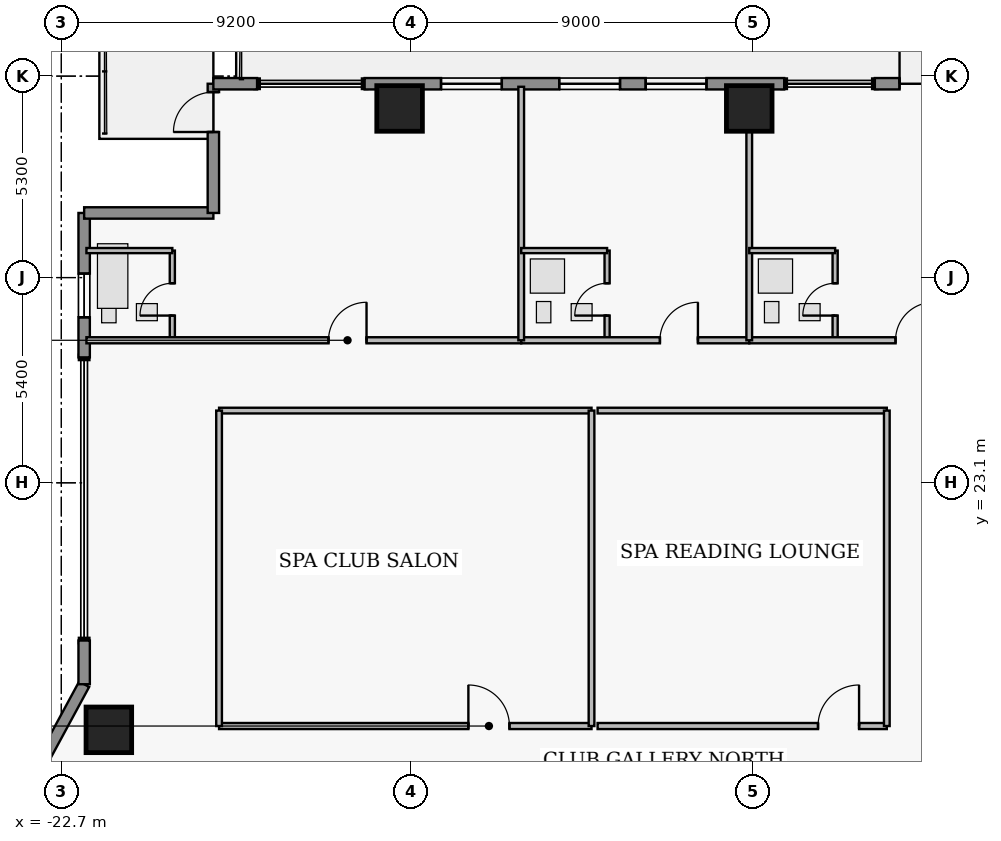
"""IFC4 building model, lengths in metres.
Left out: names, types, materials, properties, quantities, classifications, styles, units other than length and angle.
Written with IfcOpenShell. Run it as: python <this file> out.ifc"""

import sys

from ifc_helpers import new_model, si_unit, direction, frame, frame_2d, origin, origin_2d, place, context, subcontext, project, spatial, rectangle, extrude, element, fill, save


model = new_model("IFC4")
c1 = context("Model", 3, precision=1e-05, world=origin(), true_north=direction((0.0, 1.0)))
c2 = subcontext(c1, "Body", "Model", "MODEL_VIEW")
j1 = project(units=[si_unit("LENGTHUNIT", "METRE"), si_unit("PLANEANGLEUNIT", "RADIAN")], contexts=[c1])
p1 = place(None, origin())
s1 = spatial("IfcSite", under=j1, at=p1, CompositionType="ELEMENT")
p2 = place(p1, origin())
s2 = spatial("IfcBuilding", under=s1, at=p2, CompositionType="ELEMENT")
p3 = place(p2, frame((0.0, 0.0, 181.15)))
s3 = spatial("IfcBuildingStorey", under=s2, at=p3, CompositionType="ELEMENT", Elevation=181.15)
for number, where, z_axis, x_axis in (
    (1, (-13.8, 32.95, 0.0), (0.0, 0.0, 1.0), (1.0, 0.0, 0.0)),
    (2, (-4.6, 32.95, 0.0), (0.0, 0.0, 1.0), (1.0, 0.0, 0.0)),
    (3, (-21.45, 16.6, 0.0), (0.0, 0.0, 1.0), (1.0, 0.0, 0.0)),
):
    element("IfcColumn", number, at=place(p3, frame(where, z_axis=z_axis, x_axis=x_axis)), inside=s3, PredefinedType="COLUMN", context=c2, shape_type="SweptSolid", body=[
        extrude(rectangle(XDim=1.2, YDim=1.2, at=origin_2d()), origin(), (0.0, 0.0, 1.0), 3.75),
    ])
p4 = place(p3, frame((-24.7, 13.0, 0.0), z_axis=(0.0, 0.0, 1.0), x_axis=(0.476258655584, 0.879305233114, 0.0)))
e4 = element("IfcWall", 4, at=p4, inside=s3, PredefinedType="STANDARD", context=c2, shape_type="SweptSolid", body=[
    extrude(rectangle(XDim=5.459, YDim=0.3, at=frame_2d((2.729, 0.0))), origin(), (0.0, 0.0, 1.0), 3.53),
])
p5 = place(p3, frame((-22.1, 17.8, 0.0), z_axis=(0.0, 0.0, 1.0), x_axis=(0.0, 1.0, 0.0)))
e5 = element("IfcWall", 5, at=p5, inside=s3, PredefinedType="STANDARD", context=c2, shape_type="SweptSolid", body=[
    extrude(rectangle(XDim=1.15, YDim=0.3, at=frame_2d((0.575, 0.0))), origin(), (0.0, 0.0, 1.0), 3.53),
])
p6 = place(p3, frame((-22.1, 26.4, 0.0), z_axis=(0.0, 0.0, 1.0), x_axis=(0.0, 1.0, 0.0)))
e6 = element("IfcWall", 6, at=p6, inside=s3, PredefinedType="STANDARD", context=c2, shape_type="SweptSolid", body=[
    extrude(rectangle(XDim=3.8, YDim=0.3, at=frame_2d((1.9, 0.0))), origin(), (0.0, 0.0, 1.0), 3.53),
])
p7 = place(p6, frame((1.055, 0.0, 0.95)))
e7 = element("IfcOpeningElement", 7, at=p7, cuts=e6, PredefinedType="OPENING", context=c2, shape_type="SweptSolid", body=[
    extrude(rectangle(XDim=1.15, YDim=1.55, at=frame_2d((0.575, 0.775))), frame((0.0, 0.16, 0.0), z_axis=(0.0, -1.0, 0.0), x_axis=(1.0, 0.0, 0.0)), (0.0, 0.0, 1.0), 0.32),
])
p8 = place(p3, frame((-22.1, 30.2, 0.0), z_axis=(0.0, 0.0, 1.0), x_axis=(1.0, 0.0, 0.0)))
e8 = element("IfcWall", 8, at=p8, inside=s3, PredefinedType="STANDARD", context=c2, shape_type="SweptSolid", body=[
    extrude(rectangle(XDim=3.4, YDim=0.3, at=frame_2d((1.7, 0.0))), origin(), (0.0, 0.0, 1.0), 3.53),
])
p9 = place(p3, frame((-18.7, 30.2, 0.0), z_axis=(0.0, 0.0, 1.0), x_axis=(0.0, 1.0, 0.0)))
e9 = element("IfcWall", 9, at=p9, inside=s3, PredefinedType="STANDARD", context=c2, shape_type="SweptSolid", body=[
    extrude(rectangle(XDim=3.4, YDim=0.3, at=frame_2d((1.7, 0.0))), origin(), (0.0, 0.0, 1.0), 3.53),
])
p10 = place(p9, frame((2.13, 0.0, 0.0)))
e10 = element("IfcOpeningElement", 10, at=p10, cuts=e9, PredefinedType="OPENING", context=c2, shape_type="SweptSolid", body=[
    extrude(rectangle(XDim=1.05, YDim=2.2, at=frame_2d((0.525, 1.1))), frame((0.0, 0.16, 0.0), z_axis=(0.0, -1.0, 0.0), x_axis=(1.0, 0.0, 0.0)), (0.0, 0.0, 1.0), 0.32),
])
p11 = place(p3, frame((-18.7, 33.6, 0.0), z_axis=(0.0, 0.0, 1.0), x_axis=(1.0, 0.0, 0.0)))
e11 = element("IfcWall", 11, at=p11, inside=s3, PredefinedType="STANDARD", context=c2, shape_type="SweptSolid", body=[
    extrude(rectangle(XDim=1.15, YDim=0.3, at=frame_2d((0.575, 0.0))), origin(), (0.0, 0.0, 1.0), 3.53),
])
p12 = place(p3, frame((-14.72, 33.6, 0.0), z_axis=(0.0, 0.0, 1.0), x_axis=(1.0, 0.0, 0.0)))
e12 = element("IfcWall", 12, at=p12, inside=s3, PredefinedType="STANDARD", context=c2, shape_type="SweptSolid", body=[
    extrude(rectangle(XDim=11.04, YDim=0.3, at=frame_2d((5.52, 0.0))), origin(), (0.0, 0.0, 1.0), 3.53),
])
p13 = place(p12, frame((5.12, 0.0, 0.85)))
e13 = element("IfcOpeningElement", 13, at=p13, cuts=e12, PredefinedType="OPENING", context=c2, shape_type="SweptSolid", body=[
    extrude(rectangle(XDim=1.6, YDim=1.8, at=frame_2d((0.8, 0.9))), frame((0.0, 0.16, 0.0), z_axis=(0.0, -1.0, 0.0), x_axis=(1.0, 0.0, 0.0)), (0.0, 0.0, 1.0), 0.32),
])
p14 = place(p12, frame((2.01, 0.0, 0.85)))
e14 = element("IfcOpeningElement", 14, at=p14, cuts=e12, PredefinedType="OPENING", context=c2, shape_type="SweptSolid", body=[
    extrude(rectangle(XDim=1.6, YDim=1.8, at=frame_2d((0.8, 0.9))), frame((0.0, 0.16, 0.0), z_axis=(0.0, -1.0, 0.0), x_axis=(1.0, 0.0, 0.0)), (0.0, 0.0, 1.0), 0.32),
])
p15 = place(p12, frame((7.395, 0.0, 0.85)))
e15 = element("IfcOpeningElement", 15, at=p15, cuts=e12, PredefinedType="OPENING", context=c2, shape_type="SweptSolid", body=[
    extrude(rectangle(XDim=1.6, YDim=1.8, at=frame_2d((0.8, 0.9))), frame((0.0, 0.16, 0.0), z_axis=(0.0, -1.0, 0.0), x_axis=(1.0, 0.0, 0.0)), (0.0, 0.0, 1.0), 0.32),
])
p16 = place(p3, frame((-1.295, 33.6, 0.0), z_axis=(0.0, 0.0, 1.0), x_axis=(1.0, 0.0, 0.0)))
e16 = element("IfcWall", 16, at=p16, inside=s3, PredefinedType="STANDARD", context=c2, shape_type="SweptSolid", body=[
    extrude(rectangle(XDim=6.815, YDim=0.3, at=frame_2d((3.407, 0.0))), origin(), (0.0, 0.0, 1.0), 3.53),
])
p17 = place(p16, frame((0.65, 0.0, 0.0)))
e17 = element("IfcOpeningElement", 17, at=p17, cuts=e16, PredefinedType="OPENING", context=c2, shape_type="SweptSolid", body=[
    extrude(rectangle(XDim=1.05, YDim=2.2, at=frame_2d((0.525, 1.1))), frame((0.0, 0.16, 0.0), z_axis=(0.0, -1.0, 0.0), x_axis=(1.0, 0.0, 0.0)), (0.0, 0.0, 1.0), 0.32),
])
p18 = place(p16, frame((3.63, 0.0, 0.95)))
e18 = element("IfcOpeningElement", 18, at=p18, cuts=e16, PredefinedType="OPENING", context=c2, shape_type="SweptSolid", body=[
    extrude(rectangle(XDim=1.15, YDim=1.55, at=frame_2d((0.575, 0.775))), frame((0.0, 0.16, 0.0), z_axis=(0.0, -1.0, 0.0), x_axis=(1.0, 0.0, 0.0)), (0.0, 0.0, 1.0), 0.32),
])
p19 = place(p3, frame((-19.78, 26.85, 0.0), z_axis=(0.0, 0.0, 1.0), x_axis=(0.0, 1.0, 0.0)))
e19 = element("IfcWall", 19, at=p19, inside=s3, PredefinedType="PLUMBINGWALL", context=c2, shape_type="SweptSolid", body=[
    extrude(rectangle(XDim=2.36, YDim=0.135, at=frame_2d((1.18, 0.0))), origin(), (0.0, 0.0, 1.0), 3.53),
])
p20 = place(p19, frame((0.65, 0.0, 0.0)))
e20 = element("IfcOpeningElement", 20, at=p20, cuts=e19, PredefinedType="OPENING", context=c2, shape_type="SweptSolid", body=[
    extrude(rectangle(XDim=0.85, YDim=2.1, at=frame_2d((0.425, 1.05))), frame((0.0, 0.077, 0.0), z_axis=(0.0, -1.0, 0.0), x_axis=(1.0, 0.0, 0.0)), (0.0, 0.0, 1.0), 0.155),
])
p21 = place(p3, frame((-22.04, 26.85, 0.0), z_axis=(0.0, 0.0, 1.0), x_axis=(1.0, 0.0, 0.0)))
e21 = element("IfcWall", 21, at=p21, inside=s3, PredefinedType="PARTITIONING", context=c2, shape_type="SweptSolid", body=[
    extrude(rectangle(XDim=11.44, YDim=0.16, at=frame_2d((5.72, 0.0))), origin(), (0.0, 0.0, 1.0), 3.53),
])
p22 = place(p21, frame((6.37, 0.0, 0.0)))
e22 = element("IfcOpeningElement", 22, at=p22, cuts=e21, PredefinedType="OPENING", context=c2, shape_type="SweptSolid", body=[
    extrude(rectangle(XDim=1.0, YDim=2.15, at=frame_2d((0.5, 1.075))), frame((0.0, 0.09, 0.0), z_axis=(0.0, -1.0, 0.0), x_axis=(1.0, 0.0, 0.0)), (0.0, 0.0, 1.0), 0.18),
])
p23 = place(p3, frame((-8.34, 26.85, 0.0), z_axis=(0.0, 0.0, 1.0), x_axis=(0.0, 1.0, 0.0)))
e23 = element("IfcWall", 23, at=p23, inside=s3, PredefinedType="PLUMBINGWALL", context=c2, shape_type="SweptSolid", body=[
    extrude(rectangle(XDim=2.36, YDim=0.135, at=frame_2d((1.18, 0.0))), origin(), (0.0, 0.0, 1.0), 3.53),
])
p24 = place(p23, frame((0.65, 0.0, 0.0)))
e24 = element("IfcOpeningElement", 24, at=p24, cuts=e23, PredefinedType="OPENING", context=c2, shape_type="SweptSolid", body=[
    extrude(rectangle(XDim=0.85, YDim=2.1, at=frame_2d((0.425, 1.05))), frame((0.0, 0.077, 0.0), z_axis=(0.0, -1.0, 0.0), x_axis=(1.0, 0.0, 0.0)), (0.0, 0.0, 1.0), 0.155),
])
p25 = place(p3, frame((-10.6, 26.85, 0.0), z_axis=(0.0, 0.0, 1.0), x_axis=(1.0, 0.0, 0.0)))
e25 = element("IfcWall", 25, at=p25, inside=s3, PredefinedType="PARTITIONING", context=c2, shape_type="SweptSolid", body=[
    extrude(rectangle(XDim=6.0, YDim=0.16, at=frame_2d((3.0, 0.0))), origin(), (0.0, 0.0, 1.0), 3.53),
])
p26 = place(p25, frame((3.65, 0.0, 0.0)))
e26 = element("IfcOpeningElement", 26, at=p26, cuts=e25, PredefinedType="OPENING", context=c2, shape_type="SweptSolid", body=[
    extrude(rectangle(XDim=1.0, YDim=2.15, at=frame_2d((0.5, 1.075))), frame((0.0, 0.09, 0.0), z_axis=(0.0, -1.0, 0.0), x_axis=(1.0, 0.0, 0.0)), (0.0, 0.0, 1.0), 0.18),
])
p27 = place(p3, frame((-2.34, 26.85, 0.0), z_axis=(0.0, 0.0, 1.0), x_axis=(0.0, 1.0, 0.0)))
e27 = element("IfcWall", 27, at=p27, inside=s3, PredefinedType="PLUMBINGWALL", context=c2, shape_type="SweptSolid", body=[
    extrude(rectangle(XDim=2.36, YDim=0.135, at=frame_2d((1.18, 0.0))), origin(), (0.0, 0.0, 1.0), 3.53),
])
p28 = place(p27, frame((0.65, 0.0, 0.0)))
e28 = element("IfcOpeningElement", 28, at=p28, cuts=e27, PredefinedType="OPENING", context=c2, shape_type="SweptSolid", body=[
    extrude(rectangle(XDim=0.85, YDim=2.1, at=frame_2d((0.425, 1.05))), frame((0.0, 0.077, 0.0), z_axis=(0.0, -1.0, 0.0), x_axis=(1.0, 0.0, 0.0)), (0.0, 0.0, 1.0), 0.155),
])
p29 = place(p3, frame((-4.6, 26.85, 0.0), z_axis=(0.0, 0.0, 1.0), x_axis=(1.0, 0.0, 0.0)))
e29 = element("IfcWall", 29, at=p29, inside=s3, PredefinedType="PARTITIONING", context=c2, shape_type="SweptSolid", body=[
    extrude(rectangle(XDim=6.4, YDim=0.16, at=frame_2d((3.2, 0.0))), origin(), (0.0, 0.0, 1.0), 3.53),
])
p30 = place(p29, frame((3.85, 0.0, 0.0)))
e30 = element("IfcOpeningElement", 30, at=p30, cuts=e29, PredefinedType="OPENING", context=c2, shape_type="SweptSolid", body=[
    extrude(rectangle(XDim=1.0, YDim=2.15, at=frame_2d((0.5, 1.075))), frame((0.0, 0.09, 0.0), z_axis=(0.0, -1.0, 0.0), x_axis=(1.0, 0.0, 0.0)), (0.0, 0.0, 1.0), 0.18),
])
p31 = place(p3, frame((-18.55, 16.7, 0.0), z_axis=(0.0, 0.0, 1.0), x_axis=(1.0, 0.0, 0.0)))
e31 = element("IfcWall", 31, at=p31, inside=s3, PredefinedType="PARTITIONING", context=c2, shape_type="SweptSolid", body=[
    extrude(rectangle(XDim=9.8, YDim=0.16, at=frame_2d((4.9, 0.0))), origin(), (0.0, 0.0, 1.0), 3.124),
])
p32 = place(p31, frame((6.56, 0.0, 0.0)))
e32 = element("IfcOpeningElement", 32, at=p32, cuts=e31, PredefinedType="OPENING", context=c2, shape_type="SweptSolid", body=[
    extrude(rectangle(XDim=1.08, YDim=2.18, at=frame_2d((0.54, 1.09))), frame((0.0, 0.09, 0.0), z_axis=(0.0, -1.0, 0.0), x_axis=(1.0, 0.0, 0.0)), (0.0, 0.0, 1.0), 0.18),
])
p33 = place(p3, frame((-8.59, 16.7, 0.0), z_axis=(0.0, 0.0, 1.0), x_axis=(1.0, 0.0, 0.0)))
e33 = element("IfcWall", 33, at=p33, inside=s3, PredefinedType="PARTITIONING", context=c2, shape_type="SweptSolid", body=[
    extrude(rectangle(XDim=7.61, YDim=0.16, at=frame_2d((3.805, 0.0))), origin(), (0.0, 0.0, 1.0), 3.124),
])
p34 = place(p33, frame((5.8, 0.0, 0.0)))
e34 = element("IfcOpeningElement", 34, at=p34, cuts=e33, PredefinedType="OPENING", context=c2, shape_type="SweptSolid", body=[
    extrude(rectangle(XDim=1.08, YDim=2.18, at=frame_2d((0.54, 1.09))), frame((0.0, 0.09, 0.0), z_axis=(0.0, -1.0, 0.0), x_axis=(1.0, 0.0, 0.0)), (0.0, 0.0, 1.0), 0.18),
])
p35 = place(p3, frame((-22.04, 29.21, 0.0), z_axis=(0.0, 0.0, 1.0), x_axis=(1.0, 0.0, 0.0)))
e35 = element("IfcWall", 35, at=p35, inside=s3, PredefinedType="PLUMBINGWALL", context=c2, shape_type="SweptSolid", body=[
    extrude(rectangle(XDim=2.26, YDim=0.135, at=frame_2d((1.13, 0.0))), origin(), (0.0, 0.0, 1.0), 3.53),
])
p36 = place(p3, frame((-10.6, 26.85, 0.0), z_axis=(0.0, 0.0, 1.0), x_axis=(0.0, 1.0, 0.0)))
e36 = element("IfcWall", 36, at=p36, inside=s3, PredefinedType="PARTITIONING", context=c2, shape_type="SweptSolid", body=[
    extrude(rectangle(XDim=6.67, YDim=0.15, at=frame_2d((3.335, 0.0))), origin(), (0.0, 0.0, 1.0), 3.53),
])
p37 = place(p3, frame((-10.6, 29.21, 0.0), z_axis=(0.0, 0.0, 1.0), x_axis=(1.0, 0.0, 0.0)))
e37 = element("IfcWall", 37, at=p37, inside=s3, PredefinedType="PLUMBINGWALL", context=c2, shape_type="SweptSolid", body=[
    extrude(rectangle(XDim=2.26, YDim=0.135, at=frame_2d((1.13, 0.0))), origin(), (0.0, 0.0, 1.0), 3.53),
])
p38 = place(p3, frame((-4.6, 26.85, 0.0), z_axis=(0.0, 0.0, 1.0), x_axis=(0.0, 1.0, 0.0)))
e38 = element("IfcWall", 38, at=p38, inside=s3, PredefinedType="PARTITIONING", context=c2, shape_type="SweptSolid", body=[
    extrude(rectangle(XDim=6.67, YDim=0.15, at=frame_2d((3.335, 0.0))), origin(), (0.0, 0.0, 1.0), 2.519),
])
p39 = place(p3, frame((-4.6, 29.21, 0.0), z_axis=(0.0, 0.0, 1.0), x_axis=(1.0, 0.0, 0.0)))
e39 = element("IfcWall", 39, at=p39, inside=s3, PredefinedType="PLUMBINGWALL", context=c2, shape_type="SweptSolid", body=[
    extrude(rectangle(XDim=2.26, YDim=0.135, at=frame_2d((1.13, 0.0))), origin(), (0.0, 0.0, 1.0), 3.53),
])
p40 = place(p3, frame((-18.55, 25.0, 0.0), z_axis=(0.0, 0.0, 1.0), x_axis=(1.0, 0.0, 0.0)))
e40 = element("IfcWall", 40, at=p40, inside=s3, PredefinedType="PARTITIONING", context=c2, shape_type="SweptSolid", body=[
    extrude(rectangle(XDim=9.8, YDim=0.15, at=frame_2d((4.9, 0.0))), origin(), (0.0, 0.0, 1.0), 3.124),
])
for number, where, z_axis, x_axis in (
    (41, (-18.55, 16.7, 0.0), (0.0, 0.0, 1.0), (0.0, 1.0, 0.0)),
    (42, (-8.75, 16.7, 0.0), (0.0, 0.0, 1.0), (0.0, 1.0, 0.0)),
):
    element("IfcWall", number, at=place(p3, frame(where, z_axis=z_axis, x_axis=x_axis)), inside=s3, PredefinedType="PARTITIONING", context=c2, shape_type="SweptSolid", body=[
        extrude(rectangle(XDim=8.3, YDim=0.15, at=frame_2d((4.15, 0.0))), origin(), (0.0, 0.0, 1.0), 3.53),
    ])
p41 = place(p3, frame((-8.59, 25.0, 0.0), z_axis=(0.0, 0.0, 1.0), x_axis=(1.0, 0.0, 0.0)))
e43 = element("IfcWall", 43, at=p41, inside=s3, PredefinedType="PARTITIONING", context=c2, shape_type="SweptSolid", body=[
    extrude(rectangle(XDim=7.61, YDim=0.15, at=frame_2d((3.805, 0.0))), origin(), (0.0, 0.0, 1.0), 3.124),
])
p42 = place(p3, frame((-0.98, 16.7, 0.0), z_axis=(0.0, 0.0, 1.0), x_axis=(0.0, 1.0, 0.0)))
e44 = element("IfcWall", 44, at=p42, inside=s3, PredefinedType="PARTITIONING", context=c2, shape_type="SweptSolid", body=[
    extrude(rectangle(XDim=8.3, YDim=0.15, at=frame_2d((4.15, 0.0))), origin(), (0.0, 0.0, 1.0), 3.53),
])
p43 = place(p7, origin())
e45 = element("IfcWindow", 45, at=p43, inside=s3, PartitioningType="SINGLE_PANEL", PredefinedType="WINDOW", context=c2, shape_type="SweptSolid", body=[
    extrude(rectangle(XDim=1.15, YDim=1.55, at=frame_2d((0.575, 0.775))), frame((0.0, 0.03, 0.0), z_axis=(0.0, -1.0, 0.0), x_axis=(1.0, 0.0, 0.0)), (0.0, 0.0, 1.0), 0.06),
])
fill(e7, e45)
p44 = place(p10, origin())
e46 = element("IfcDoor", 46, at=p44, inside=s3, OperationType="SINGLE_SWING_LEFT", PredefinedType="DOOR", context=c2, shape_type="SweptSolid", body=[
    extrude(rectangle(XDim=1.05, YDim=2.2, at=frame_2d((0.525, 1.1))), frame((0.0, 0.025, 0.0), z_axis=(0.0, -1.0, 0.0), x_axis=(1.0, 0.0, 0.0)), (0.0, 0.0, 1.0), 0.05),
])
fill(e10, e46)
p45 = place(p13, origin())
e47 = element("IfcWindow", 47, at=p45, inside=s3, PartitioningType="SINGLE_PANEL", PredefinedType="WINDOW", context=c2, shape_type="SweptSolid", body=[
    extrude(rectangle(XDim=1.6, YDim=1.8, at=frame_2d((0.8, 0.9))), frame((0.0, 0.03, 0.0), z_axis=(0.0, -1.0, 0.0), x_axis=(1.0, 0.0, 0.0)), (0.0, 0.0, 1.0), 0.06),
])
fill(e13, e47)
p46 = place(p14, origin())
e48 = element("IfcWindow", 48, at=p46, inside=s3, PartitioningType="SINGLE_PANEL", PredefinedType="WINDOW", context=c2, shape_type="SweptSolid", body=[
    extrude(rectangle(XDim=1.6, YDim=1.8, at=frame_2d((0.8, 0.9))), frame((0.0, 0.03, 0.0), z_axis=(0.0, -1.0, 0.0), x_axis=(1.0, 0.0, 0.0)), (0.0, 0.0, 1.0), 0.06),
])
fill(e14, e48)
p47 = place(p15, origin())
e49 = element("IfcWindow", 49, at=p47, inside=s3, PartitioningType="SINGLE_PANEL", PredefinedType="WINDOW", context=c2, shape_type="SweptSolid", body=[
    extrude(rectangle(XDim=1.6, YDim=1.8, at=frame_2d((0.8, 0.9))), frame((0.0, 0.03, 0.0), z_axis=(0.0, -1.0, 0.0), x_axis=(1.0, 0.0, 0.0)), (0.0, 0.0, 1.0), 0.06),
])
fill(e15, e49)
p48 = place(p17, origin())
e50 = element("IfcDoor", 50, at=p48, inside=s3, OperationType="SINGLE_SWING_LEFT", PredefinedType="DOOR", context=c2, shape_type="SweptSolid", body=[
    extrude(rectangle(XDim=1.05, YDim=2.2, at=frame_2d((0.525, 1.1))), frame((0.0, 0.025, 0.0), z_axis=(0.0, -1.0, 0.0), x_axis=(1.0, 0.0, 0.0)), (0.0, 0.0, 1.0), 0.05),
])
fill(e17, e50)
p49 = place(p20, origin())
e51 = element("IfcDoor", 51, at=p49, inside=s3, OperationType="SINGLE_SWING_LEFT", PredefinedType="DOOR", context=c2, shape_type="SweptSolid", body=[
    extrude(rectangle(XDim=0.85, YDim=2.1, at=frame_2d((0.425, 1.05))), frame((0.0, 0.025, 0.0), z_axis=(0.0, -1.0, 0.0), x_axis=(1.0, 0.0, 0.0)), (0.0, 0.0, 1.0), 0.05),
])
fill(e20, e51)
p50 = place(p22, origin())
e52 = element("IfcDoor", 52, at=p50, inside=s3, OperationType="SINGLE_SWING_RIGHT", PredefinedType="DOOR", context=c2, shape_type="SweptSolid", body=[
    extrude(rectangle(XDim=1.0, YDim=2.15, at=frame_2d((0.5, 1.075))), frame((0.0, 0.025, 0.0), z_axis=(0.0, -1.0, 0.0), x_axis=(1.0, 0.0, 0.0)), (0.0, 0.0, 1.0), 0.05),
])
fill(e22, e52)
p51 = place(p24, origin())
e53 = element("IfcDoor", 53, at=p51, inside=s3, OperationType="SINGLE_SWING_LEFT", PredefinedType="DOOR", context=c2, shape_type="SweptSolid", body=[
    extrude(rectangle(XDim=0.85, YDim=2.1, at=frame_2d((0.425, 1.05))), frame((0.0, 0.025, 0.0), z_axis=(0.0, -1.0, 0.0), x_axis=(1.0, 0.0, 0.0)), (0.0, 0.0, 1.0), 0.05),
])
fill(e24, e53)
p52 = place(p26, origin())
e54 = element("IfcDoor", 54, at=p52, inside=s3, OperationType="SINGLE_SWING_RIGHT", PredefinedType="DOOR", context=c2, shape_type="SweptSolid", body=[
    extrude(rectangle(XDim=1.0, YDim=2.15, at=frame_2d((0.5, 1.075))), frame((0.0, 0.025, 0.0), z_axis=(0.0, -1.0, 0.0), x_axis=(1.0, 0.0, 0.0)), (0.0, 0.0, 1.0), 0.05),
])
fill(e26, e54)
p53 = place(p28, origin())
e55 = element("IfcDoor", 55, at=p53, inside=s3, OperationType="SINGLE_SWING_LEFT", PredefinedType="DOOR", context=c2, shape_type="SweptSolid", body=[
    extrude(rectangle(XDim=0.85, YDim=2.1, at=frame_2d((0.425, 1.05))), frame((0.0, 0.025, 0.0), z_axis=(0.0, -1.0, 0.0), x_axis=(1.0, 0.0, 0.0)), (0.0, 0.0, 1.0), 0.05),
])
fill(e28, e55)
p54 = place(p30, origin())
e56 = element("IfcDoor", 56, at=p54, inside=s3, OperationType="SINGLE_SWING_RIGHT", PredefinedType="DOOR", context=c2, shape_type="SweptSolid", body=[
    extrude(rectangle(XDim=1.0, YDim=2.15, at=frame_2d((0.5, 1.075))), frame((0.0, 0.025, 0.0), z_axis=(0.0, -1.0, 0.0), x_axis=(1.0, 0.0, 0.0)), (0.0, 0.0, 1.0), 0.05),
])
fill(e30, e56)
p55 = place(p32, origin())
e57 = element("IfcDoor", 57, at=p55, inside=s3, OperationType="SINGLE_SWING_LEFT", PredefinedType="DOOR", context=c2, shape_type="SweptSolid", body=[
    extrude(rectangle(XDim=1.08, YDim=2.18, at=frame_2d((0.54, 1.09))), frame((0.0, 0.025, 0.0), z_axis=(0.0, -1.0, 0.0), x_axis=(1.0, 0.0, 0.0)), (0.0, 0.0, 1.0), 0.05),
])
fill(e32, e57)
p56 = place(p34, origin())
e58 = element("IfcDoor", 58, at=p56, inside=s3, OperationType="SINGLE_SWING_RIGHT", PredefinedType="DOOR", context=c2, shape_type="SweptSolid", body=[
    extrude(rectangle(XDim=1.08, YDim=2.18, at=frame_2d((0.54, 1.09))), frame((0.0, 0.025, 0.0), z_axis=(0.0, -1.0, 0.0), x_axis=(1.0, 0.0, 0.0)), (0.0, 0.0, 1.0), 0.05),
])
fill(e34, e58)
save(model, sys.argv[1])
